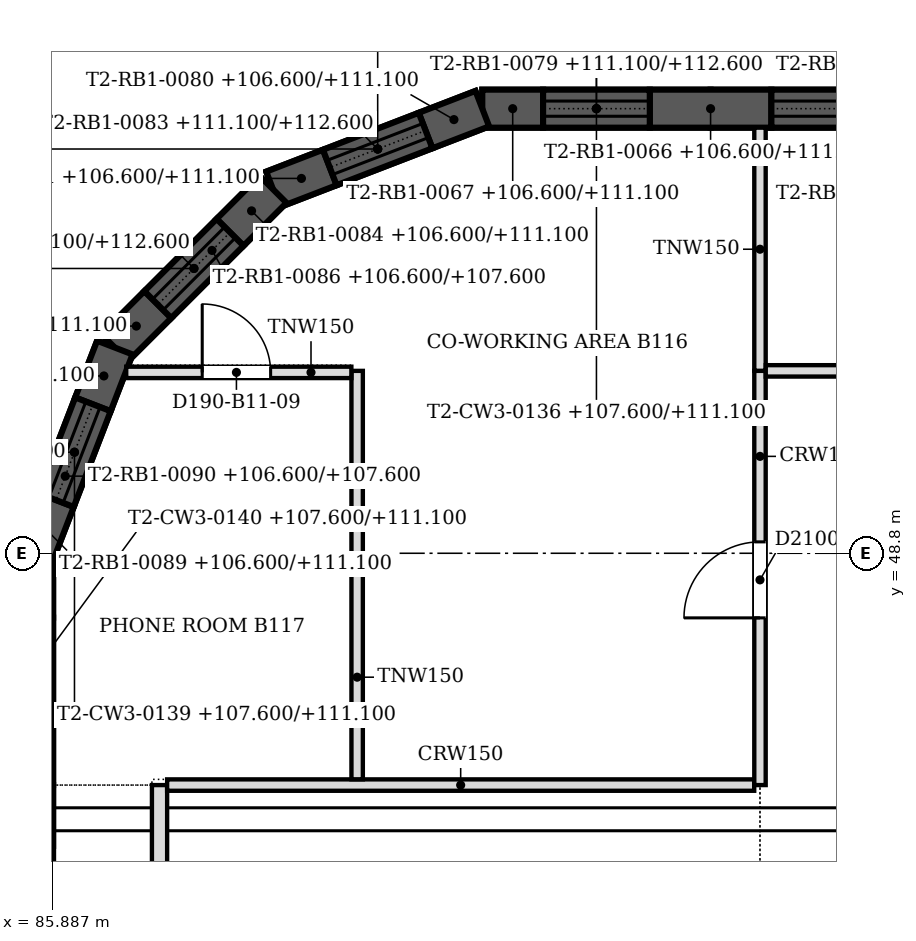
"""IFC4 building model, lengths in metres.
Left out: names, types, materials, properties, quantities, classifications, styles, units other than length and angle.
Written with IfcOpenShell. Run it as: python <this file> out.ifc"""

import sys

from ifc_helpers import new_model, si_unit, direction, frame, frame_2d, origin, place, context, subcontext, project, spatial, polyline, rectangle, outline, extrude, faceted_brep, source, transform, mapped, element, fill, save


model = new_model("IFC4")
c1 = context("Model", 3, precision=1e-05, world=origin(), true_north=direction((0.0, 1.0)))
c2 = subcontext(c1, "Body", "Model", "MODEL_VIEW")
j1 = project(units=[si_unit("LENGTHUNIT", "METRE"), si_unit("PLANEANGLEUNIT", "RADIAN")], contexts=[c1])
p1 = place(None, origin())
s1 = spatial("IfcSite", under=j1, at=p1, CompositionType="ELEMENT")
p2 = place(p1, origin())
s2 = spatial("IfcBuilding", under=s1, at=p2, CompositionType="ELEMENT")
p3 = place(p2, frame((0.0, 0.0, 106.6)))
s3 = spatial("IfcBuildingStorey", under=s2, at=p3, CompositionType="ELEMENT", Elevation=106.6)
m1 = source(origin(), c2, "Body", "SweptSolid", [
    extrude(outline(polyline([(0.0, 0.0), (1.6, 0.0), (1.6, 4.5), (0.0, 4.5), (0.0, 0.0)])), frame((0.0, 0.25, 0.0), z_axis=(0.0, -1.0, 0.0), x_axis=(1.0, 0.0, 0.0)), (0.0, 0.0, 1.0), 0.5),
])
p4 = place(p3, frame((95.35, 54.65, 0.0), z_axis=(0.0, 0.0, 1.0), x_axis=(-1.0, 0.0, 0.0)))
e1 = element("IfcWall", 1, at=p4, inside=s3, PredefinedType="SOLIDWALL", context=c2, shape_type="MappedRepresentation", body=[
    mapped(m1, transform((0.0, 0.0, 0.0), scale=1.0)),
])
m2 = source(origin(), c2, "Body", "Brep", [
    faceted_brep([(0.0, -0.25, 0.0), (0.8, -0.25, 0.0), (0.8, -0.25, 4.5), (0.0, -0.25, 4.5), (0.0, 0.25, 4.5), (0.753, 0.25, 4.5), (0.753, 0.25, 0.0), (0.0, 0.25, 0.0), (0.8, -0.0, 0.0), (0.8, -0.0, 4.5)], [[[0, 1, 2, 3]], [[4, 5, 6, 7]], [[7, 6, 8, 1, 0]], [[9, 2, 1, 8]], [[5, 4, 3, 2, 9]], [[4, 7, 0, 3]], [[8, 6, 5, 9]]]),
])
p5 = place(p3, frame((92.346, 54.65, 0.0), z_axis=(0.0, 0.0, 1.0), x_axis=(-1.0, 0.0, 0.0)))
e2 = element("IfcWall", 2, at=p5, inside=s3, PredefinedType="SOLIDWALL", context=c2, shape_type="MappedRepresentation", body=[
    mapped(m2, transform((0.0, 0.0, 0.0), scale=1.0)),
])
m3 = source(origin(), c2, "Body", "SweptSolid", [
    extrude(outline(polyline([(0.0, 0.0), (4.5, 0.0), (4.5, 1.0), (0.0, 1.0), (0.0, 0.0)])), frame((0.0, 0.25, 0.0), z_axis=(0.0, -1.0, 0.0), x_axis=(1.0, 0.0, 0.0)), (0.0, 0.0, 1.0), 0.5),
])
p6 = place(p3, frame((99.85, 54.65, 0.0), z_axis=(0.0, 0.0, 1.0), x_axis=(-1.0, 0.0, 0.0)))
e3 = element("IfcWall", 3, at=p6, inside=s3, PredefinedType="SOLIDWALL", context=c2, shape_type="MappedRepresentation", body=[
    mapped(m3, transform((0.0, 0.0, 0.0), scale=1.0)),
])
m4 = source(origin(), c2, "Body", "Brep", [
    faceted_brep([(0.0, -0.25, 0.0), (6.1, -0.25, 0.0), (6.1, -0.25, 1.5), (0.0, -0.25, 1.5), (0.0, 0.25, 1.5), (6.1, 0.25, 1.5), (6.1, 0.25, 0.0), (0.0, 0.25, 0.0)], [[[0, 1, 2, 3]], [[4, 5, 6, 7]], [[7, 6, 1, 0]], [[5, 4, 3, 2]], [[4, 7, 0, 3]], [[1, 6, 5, 2]]]),
])
p7 = place(p3, frame((100.65, 54.65, 4.5), z_axis=(0.0, 0.0, 1.0), x_axis=(-1.0, 0.0, 0.0)))
e4 = element("IfcWall", 4, at=p7, inside=s3, PredefinedType="SOLIDWALL", context=c2, shape_type="MappedRepresentation", body=[
    mapped(m4, transform((0.0, 0.0, 0.0), scale=1.0)),
])
m5 = source(origin(), c2, "Body", "SweptSolid", [
    extrude(outline(polyline([(0.0, 0.0), (1.404, 0.0), (1.404, 1.0), (0.0, 1.0), (0.0, 0.0)])), frame((0.0, 0.25, 0.0), z_axis=(0.0, -1.0, 0.0), x_axis=(1.0, 0.0, 0.0)), (0.0, 0.0, 1.0), 0.5),
])
p8 = place(p3, frame((93.75, 54.65, 0.0), z_axis=(0.0, 0.0, 1.0), x_axis=(-1.0, 0.0, 0.0)))
e5 = element("IfcWall", 5, at=p8, inside=s3, PredefinedType="SOLIDWALL", context=c2, shape_type="MappedRepresentation", body=[
    mapped(m5, transform((0.0, 0.0, 0.0), scale=1.0)),
])
m6 = source(origin(), c2, "Body", "Brep", [
    faceted_brep([(0.0, -0.25, 0.0), (3.003, -0.25, 0.0), (3.003, -0.25, 1.5), (0.0, -0.25, 1.5), (0.0, 0.25, 1.5), (2.957, 0.25, 1.5), (2.957, 0.25, 0.0), (0.0, 0.25, 0.0), (3.003, 0.0, 0.0), (3.003, 0.0, 1.5)], [[[0, 1, 2, 3]], [[4, 5, 6, 7]], [[7, 6, 8, 1, 0]], [[9, 2, 1, 8]], [[5, 4, 3, 2, 9]], [[4, 7, 0, 3]], [[8, 6, 5, 9]]]),
])
p9 = place(p3, frame((94.55, 54.65, 4.5), z_axis=(0.0, 0.0, 1.0), x_axis=(-1.0, 0.0, 0.0)))
e6 = element("IfcWall", 6, at=p9, inside=s3, PredefinedType="SOLIDWALL", context=c2, shape_type="MappedRepresentation", body=[
    mapped(m6, transform((0.0, 0.0, 0.0), scale=1.0)),
])
m7 = source(origin(), c2, "Body", "Brep", [
    faceted_brep([(0.0, -0.25, 0.0), (0.8, -0.25, 0.0), (0.8, -0.25, 4.5), (0.0, -0.25, 4.5), (0.047, 0.25, 4.5), (0.8, 0.25, 4.5), (0.8, 0.25, 0.0), (0.047, 0.25, 0.0), (0.0, 0.0, 0.0), (0.0, 0.0, 4.5)], [[[0, 1, 2, 3]], [[4, 5, 6, 7]], [[7, 6, 1, 0, 8]], [[5, 4, 9, 3, 2]], [[8, 0, 3, 9]], [[7, 8, 9, 4]], [[1, 6, 5, 2]]]),
])
p10 = place(p3, frame((91.547, 54.65, 0.0), z_axis=(0.0, 0.0, 1.0), x_axis=(-0.933054335486, -0.359735468129, 0.0)))
e7 = element("IfcWall", 7, at=p10, inside=s3, PredefinedType="SOLIDWALL", context=c2, shape_type="MappedRepresentation", body=[
    mapped(m7, transform((0.0, 0.0, 0.0), scale=1.0)),
])
m8 = source(origin(), c2, "Body", "Brep", [
    faceted_brep([(0.0, -0.25, 0.0), (0.8, -0.25, 0.0), (0.8, -0.25, 4.5), (0.0, -0.25, 4.5), (0.0, 0.25, 4.5), (0.747, 0.25, 4.5), (0.747, 0.25, 0.0), (0.0, 0.25, 0.0), (0.8, -0.0, 0.0), (0.8, -0.0, 4.5)], [[[0, 1, 2, 3]], [[4, 5, 6, 7]], [[7, 6, 8, 1, 0]], [[9, 2, 1, 8]], [[5, 4, 3, 2, 9]], [[4, 7, 0, 3]], [[8, 6, 5, 9]]]),
])
p11 = place(p3, frame((89.54, 53.876, 0.0), z_axis=(0.0, 0.0, 1.0), x_axis=(-0.93301483327, -0.3598379092, 0.0)))
e8 = element("IfcWall", 8, at=p11, inside=s3, PredefinedType="SOLIDWALL", context=c2, shape_type="MappedRepresentation", body=[
    mapped(m8, transform((0.0, 0.0, 0.0), scale=1.0)),
])
m9 = source(origin(), c2, "Body", "SweptSolid", [
    extrude(outline(polyline([(0.0, 0.0), (1.351, 0.0), (1.351, 1.0), (0.0, 1.0), (0.0, 0.0)])), frame((0.0, 0.25, 0.0), z_axis=(0.0, -1.0, 0.0), x_axis=(1.0, 0.0, 0.0)), (0.0, 0.0, 1.0), 0.5),
])
p12 = place(p3, frame((90.8, 54.362, 0.0), z_axis=(0.0, 0.0, 1.0), x_axis=(-0.932981713512, -0.359923772835, 0.0)))
e9 = element("IfcWall", 9, at=p12, inside=s3, PredefinedType="SOLIDWALL", context=c2, shape_type="MappedRepresentation", body=[
    mapped(m9, transform((0.0, 0.0, 0.0), scale=1.0)),
])
m10 = source(origin(), c2, "Body", "Brep", [
    faceted_brep([(0.0, -0.25, 0.0), (2.95, -0.25, 0.0), (2.95, -0.25, 1.5), (0.0, -0.25, 1.5), (0.047, 0.25, 1.5), (2.898, 0.25, 1.5), (2.898, 0.25, 0.0), (0.047, 0.25, 0.0), (2.95, 0.0, 0.0), (0.0, 0.0, 0.0), (2.95, 0.0, 1.5), (0.0, 0.0, 1.5)], [[[0, 1, 2, 3]], [[4, 5, 6, 7]], [[7, 6, 8, 1, 0, 9]], [[10, 2, 1, 8]], [[5, 4, 11, 3, 2, 10]], [[9, 0, 3, 11]], [[7, 9, 11, 4]], [[8, 6, 5, 10]]]),
])
p13 = place(p3, frame((91.547, 54.65, 4.5), z_axis=(0.0, 0.0, 1.0), x_axis=(-0.933010389544, -0.359849431015, 0.0)))
e10 = element("IfcWall", 10, at=p13, inside=s3, PredefinedType="SOLIDWALL", context=c2, shape_type="MappedRepresentation", body=[
    mapped(m10, transform((0.0, 0.0, 0.0), scale=1.0)),
])
m11 = source(origin(), c2, "Body", "Brep", [
    faceted_brep([(0.0, -0.25, 0.0), (0.8, -0.25, 0.0), (0.8, -0.25, 4.5), (0.0, -0.25, 4.5), (0.053, 0.25, 4.5), (0.8, 0.25, 4.5), (0.8, 0.25, 0.0), (0.053, 0.25, 0.0), (0.0, 0.0, 0.0), (0.0, 0.0, 4.5)], [[[0, 1, 2, 3]], [[4, 5, 6, 7]], [[7, 6, 1, 0, 8]], [[5, 4, 9, 3, 2]], [[8, 0, 3, 9]], [[7, 8, 9, 4]], [[1, 6, 5, 2]]]),
])
p14 = place(p3, frame((88.794, 53.588, 0.0), z_axis=(0.0, 0.0, 1.0), x_axis=(-0.707106781187, -0.707106781187, 0.0)))
e11 = element("IfcWall", 11, at=p14, inside=s3, PredefinedType="SOLIDWALL", context=c2, shape_type="MappedRepresentation", body=[
    mapped(m11, transform((0.0, 0.0, 0.0), scale=1.0)),
])
m12 = source(origin(), c2, "Body", "Brep", [
    faceted_brep([(0.0, -0.25, 0.0), (0.8, -0.25, 0.0), (0.8, -0.25, 4.5), (0.0, -0.25, 4.5), (0.0, 0.25, 4.5), (0.747, 0.25, 4.5), (0.747, 0.25, 0.0), (0.0, 0.25, 0.0), (0.8, -0.0, 0.0), (0.8, -0.0, 4.5)], [[[0, 1, 2, 3]], [[4, 5, 6, 7]], [[7, 6, 8, 1, 0]], [[9, 2, 1, 8]], [[5, 4, 3, 2, 9]], [[4, 7, 0, 3]], [[8, 6, 5, 9]]]),
])
p15 = place(p3, frame((87.278, 52.072, 0.0), z_axis=(0.0, 0.0, 1.0), x_axis=(-0.707106781187, -0.707106781187, 0.0)))
e12 = element("IfcWall", 12, at=p15, inside=s3, PredefinedType="SOLIDWALL", context=c2, shape_type="MappedRepresentation", body=[
    mapped(m12, transform((0.0, 0.0, 0.0), scale=1.0)),
])
m13 = source(origin(), c2, "Body", "SweptSolid", [
    extrude(outline(polyline([(0.0, 0.0), (1.344, 0.0), (1.344, 1.0), (0.0, 1.0), (0.0, 0.0)])), frame((0.0, 0.25, 0.0), z_axis=(0.0, -1.0, 0.0), x_axis=(1.0, 0.0, 0.0)), (0.0, 0.0, 1.0), 0.5),
])
p16 = place(p3, frame((88.228, 53.022, 0.0), z_axis=(0.0, 0.0, 1.0), x_axis=(-0.707106781187, -0.707106781187, 0.0)))
e13 = element("IfcWall", 13, at=p16, inside=s3, PredefinedType="SOLIDWALL", context=c2, shape_type="MappedRepresentation", body=[
    mapped(m13, transform((0.0, 0.0, 0.0), scale=1.0)),
])
m14 = source(origin(), c2, "Body", "Brep", [
    faceted_brep([(0.0, -0.25, 0.0), (2.944, -0.25, 0.0), (2.944, -0.25, 1.5), (0.0, -0.25, 1.5), (0.053, 0.25, 1.5), (2.891, 0.25, 1.5), (2.891, 0.25, 0.0), (0.053, 0.25, 0.0), (2.944, 0.0, 0.0), (0.0, 0.0, 0.0), (2.944, 0.0, 1.5), (0.0, 0.0, 1.5)], [[[0, 1, 2, 3]], [[4, 5, 6, 7]], [[7, 6, 8, 1, 0, 9]], [[10, 2, 1, 8]], [[5, 4, 11, 3, 2, 10]], [[9, 0, 3, 11]], [[7, 9, 11, 4]], [[8, 6, 5, 10]]]),
])
p17 = place(p3, frame((88.794, 53.588, 4.5), z_axis=(0.0, 0.0, 1.0), x_axis=(-0.707106781187, -0.707106781187, 0.0)))
e14 = element("IfcWall", 14, at=p17, inside=s3, PredefinedType="SOLIDWALL", context=c2, shape_type="MappedRepresentation", body=[
    mapped(m14, transform((0.0, 0.0, 0.0), scale=1.0)),
])
p18 = place(p3, frame((86.712, 51.506, 0.0), z_axis=(0.0, 0.0, 1.0), x_axis=(-0.359735468129, -0.933054335486, 0.0)))
e15 = element("IfcWall", 15, at=p18, inside=s3, PredefinedType="SOLIDWALL", context=c2, shape_type="MappedRepresentation", body=[
    mapped(m11, transform((0.0, 0.0, 0.0), scale=1.0)),
])
p19 = place(p3, frame((85.938, 49.5, 0.0), z_axis=(0.0, 0.0, 1.0), x_axis=(-0.360103552367, -0.932912338632, 0.0)))
e16 = element("IfcWall", 16, at=p19, inside=s3, PredefinedType="SOLIDWALL", context=c2, shape_type="MappedRepresentation", body=[
    mapped(m2, transform((0.0, 0.0, 0.0), scale=1.0)),
])
p20 = place(p3, frame((86.424, 50.76, 0.0), z_axis=(0.0, 0.0, 1.0), x_axis=(-0.359923772835, -0.932981713512, 0.0)))
e17 = element("IfcWall", 17, at=p20, inside=s3, PredefinedType="SOLIDWALL", context=c2, shape_type="MappedRepresentation", body=[
    mapped(m9, transform((0.0, 0.0, 0.0), scale=1.0)),
])
m15 = source(origin(), c2, "Body", "Brep", [
    faceted_brep([(0.0, -0.25, 0.0), (2.95, -0.25, 0.0), (2.95, -0.25, 1.5), (0.0, -0.25, 1.5), (0.053, 0.25, 1.5), (2.904, 0.25, 1.5), (2.904, 0.25, 0.0), (0.053, 0.25, 0.0), (2.95, 0.0, 0.0), (0.0, 0.0, 0.0), (2.95, 0.0, 1.5), (0.0, 0.0, 1.5)], [[[0, 1, 2, 3]], [[4, 5, 6, 7]], [[7, 6, 8, 1, 0, 9]], [[10, 2, 1, 8]], [[5, 4, 11, 3, 2, 10]], [[9, 0, 3, 11]], [[7, 9, 11, 4]], [[8, 6, 5, 10]]]),
])
p21 = place(p3, frame((86.712, 51.506, 4.5), z_axis=(0.0, 0.0, 1.0), x_axis=(-0.359849431015, -0.933010389544, 0.0)))
e18 = element("IfcWall", 18, at=p21, inside=s3, PredefinedType="SOLIDWALL", context=c2, shape_type="MappedRepresentation", body=[
    mapped(m15, transform((0.0, 0.0, 0.0), scale=1.0)),
])
p22 = place(p3, frame((85.65, 48.753, 0.0), z_axis=(0.0, 0.0, 1.0), x_axis=(0.0, -1.0, 0.0)))
e19 = element("IfcWall", 19, at=p22, inside=s3, PredefinedType="SOLIDWALL", context=c2, shape_type="MappedRepresentation", body=[
    mapped(m7, transform((0.0, 0.0, 0.0), scale=1.0)),
])
p23 = place(p3, frame((85.65, 46.55, 0.0), z_axis=(0.0, 0.0, 1.0), x_axis=(0.0, -1.0, 0.0)))
e20 = element("IfcWall", 20, at=p23, inside=s3, PredefinedType="SOLIDWALL", context=c2, shape_type="MappedRepresentation", body=[
    mapped(m1, transform((0.0, 0.0, 0.0), scale=1.0)),
])
m16 = source(origin(), c2, "Body", "Brep", [
    faceted_brep([(0.0, -0.25, 0.0), (1.403, -0.25, 0.0), (1.403, -0.25, 1.0), (0.0, -0.25, 1.0), (0.0, 0.25, 1.0), (1.403, 0.25, 1.0), (1.403, 0.25, 0.0), (0.0, 0.25, 0.0)], [[[0, 1, 2, 3]], [[4, 5, 6, 7]], [[7, 6, 1, 0]], [[5, 4, 3, 2]], [[4, 7, 0, 3]], [[1, 6, 5, 2]]]),
])
p24 = place(p3, frame((85.65, 47.953, 0.0), z_axis=(0.0, 0.0, 1.0), x_axis=(0.0, -1.0, 0.0)))
e21 = element("IfcWall", 21, at=p24, inside=s3, PredefinedType="SOLIDWALL", context=c2, shape_type="MappedRepresentation", body=[
    mapped(m16, transform((0.0, 0.0, 0.0), scale=1.0)),
])
m17 = source(origin(), c2, "Body", "Brep", [
    faceted_brep([(0.0, -0.25, 0.0), (3.003, -0.25, 0.0), (3.003, -0.25, 1.5), (0.0, -0.25, 1.5), (0.047, 0.25, 1.5), (3.003, 0.25, 1.5), (3.003, 0.25, 0.0), (0.047, 0.25, 0.0), (0.0, 0.0, 0.0), (0.0, 0.0, 1.5)], [[[0, 1, 2, 3]], [[4, 5, 6, 7]], [[7, 6, 1, 0, 8]], [[6, 5, 2, 1]], [[5, 4, 9, 3, 2]], [[8, 0, 3, 9]], [[7, 8, 9, 4]]]),
])
p25 = place(p3, frame((85.65, 48.753, 4.5), z_axis=(0.0, 0.0, 1.0), x_axis=(0.0, -1.0, 0.0)))
e22 = element("IfcWall", 22, at=p25, inside=s3, PredefinedType="SOLIDWALL", context=c2, shape_type="MappedRepresentation", body=[
    mapped(m17, transform((0.0, 0.0, 0.0), scale=1.0)),
])
m18 = source(origin(), c2, "Body", "SweptSolid", [
    extrude(outline(polyline([(0.0, 0.0), (6.1, 0.0), (6.1, 1.5), (0.0, 1.5), (0.0, 0.0)])), frame((0.0, 0.25, 0.0), z_axis=(0.0, -1.0, 0.0), x_axis=(1.0, 0.0, 0.0)), (0.0, 0.0, 1.0), 0.5),
])
p26 = place(p3, frame((85.65, 45.75, 4.5), z_axis=(0.0, 0.0, 1.0), x_axis=(0.0, -1.0, 0.0)))
e23 = element("IfcWall", 23, at=p26, inside=s3, PredefinedType="SOLIDWALL", context=c2, shape_type="MappedRepresentation", body=[
    mapped(m18, transform((0.0, 0.0, 0.0), scale=1.0)),
])
p27 = place(p3, frame((87.3, 45.75, 0.0), z_axis=(0.0, 0.0, 1.0), x_axis=(0.0, -1.0, 0.0)))
e24 = element("IfcWall", 24, at=p27, inside=s3, PredefinedType="PARTITIONING", context=c2, shape_type="SweptSolid", body=[
    extrude(rectangle(XDim=6.1, YDim=0.2, at=frame_2d((3.05, 0.0))), origin(), (0.0, 0.0, 1.0), 5.167),
])
m19 = source(origin(), c2, "Body", "SweptSolid", [
    extrude(rectangle(XDim=2.1, YDim=2.1, at=frame_2d((1.05, 1.05))), frame((0.0, 0.11, 0.0), z_axis=(0.0, -1.0, 0.0), x_axis=(1.0, 0.0, 0.0)), (0.0, 0.0, 1.0), 0.22),
])
p28 = place(p27, frame((2.0, 0.0, 0.0)))
e25 = element("IfcOpeningElement", 25, at=p28, cuts=e24, PredefinedType="OPENING", context=c2, shape_type="MappedRepresentation", body=[
    mapped(m19, transform((0.0, 0.0, 0.0), scale=1.0)),
])
p29 = place(p3, frame((87.4, 45.75, 0.0), z_axis=(0.0, 0.0, 1.0), x_axis=(1.0, 0.0, 0.0)))
e26 = element("IfcWall", 26, at=p29, inside=s3, PredefinedType="PARTITIONING", context=c2, shape_type="SweptSolid", body=[
    extrude(rectangle(XDim=7.724, YDim=0.15, at=frame_2d((3.862, 0.0))), origin(), (0.0, 0.0, 1.0), 5.167),
])
p30 = place(p3, frame((95.2, 45.75, 0.0), z_axis=(0.0, 0.0, 1.0), x_axis=(0.0, 1.0, 0.0)))
e27 = element("IfcWall", 27, at=p30, inside=s3, PredefinedType="PARTITIONING", context=c2, shape_type="SweptSolid", body=[
    extrude(rectangle(XDim=5.45, YDim=0.15, at=frame_2d((2.725, 0.0))), origin(), (0.0, 0.0, 1.0), 5.167),
])
m20 = source(origin(), c2, "Body", "SweptSolid", [
    extrude(rectangle(XDim=1.0, YDim=2.1, at=frame_2d((0.5, 1.05))), frame((0.0, 0.085, 0.0), z_axis=(0.0, -1.0, 0.0), x_axis=(1.0, 0.0, 0.0)), (0.0, 0.0, 1.0), 0.17),
])
p31 = place(p30, frame((2.2, 0.0, 0.0)))
e28 = element("IfcOpeningElement", 28, at=p31, cuts=e27, PredefinedType="OPENING", context=c2, shape_type="MappedRepresentation", body=[
    mapped(m20, transform((0.0, 0.0, 0.0), scale=1.0)),
])
p32 = place(p3, frame((89.9, 45.826, 0.0), z_axis=(0.0, 0.0, 1.0), x_axis=(0.0, 1.0, 0.0)))
e29 = element("IfcWall", 29, at=p32, inside=s3, PredefinedType="PARTITIONING", context=c2, shape_type="SweptSolid", body=[
    extrude(rectangle(XDim=5.374, YDim=0.15, at=frame_2d((2.687, 0.0))), origin(), (0.0, 0.0, 1.0), 5.167),
])
p33 = place(p3, frame((89.824, 51.18, 0.0), z_axis=(0.0, 0.0, 1.0), x_axis=(-1.0, 0.0, 0.0)))
e30 = element("IfcWall", 30, at=p33, inside=s3, PredefinedType="PARTITIONING", context=c2, shape_type="SweptSolid", body=[
    extrude(rectangle(XDim=2.962, YDim=0.15, at=frame_2d((1.481, 0.0))), origin(), (0.0, 0.0, 1.0), 5.167),
])
m21 = source(origin(), c2, "Body", "SweptSolid", [
    extrude(rectangle(XDim=0.9, YDim=2.1, at=frame_2d((0.45, 1.05))), frame((0.0, 0.085, 0.0), z_axis=(0.0, -1.0, 0.0), x_axis=(1.0, 0.0, 0.0)), (0.0, 0.0, 1.0), 0.17),
])
p34 = place(p33, frame((1.062, 0.0, 0.0)))
e31 = element("IfcOpeningElement", 31, at=p34, cuts=e30, PredefinedType="OPENING", context=c2, shape_type="MappedRepresentation", body=[
    mapped(m21, transform((0.0, 0.0, 0.0), scale=1.0)),
])
p35 = place(p3, frame((95.2, 51.201, 0.0), z_axis=(0.0, 0.0, 1.0), x_axis=(0.0, 1.0, 0.0)))
e32 = element("IfcWall", 32, at=p35, inside=s3, PredefinedType="PARTITIONING", context=c2, shape_type="SweptSolid", body=[
    extrude(rectangle(XDim=3.199, YDim=0.15, at=frame_2d((1.6, 0.0))), origin(), (0.0, 0.0, 1.0), 5.167),
])
p36 = place(p3, frame((95.276, 51.2, 0.0), z_axis=(0.0, 0.0, 1.0), x_axis=(1.0, 0.0, 0.0)))
e33 = element("IfcWall", 33, at=p36, inside=s3, PredefinedType="PARTITIONING", context=c2, shape_type="SweptSolid", body=[
    extrude(rectangle(XDim=4.724, YDim=0.15, at=frame_2d((2.362, 0.0))), origin(), (0.0, 0.0, 1.0), 5.167),
])
p37 = place(p36, frame((1.9, 0.0, 0.0)))
e34 = element("IfcOpeningElement", 34, at=p37, cuts=e33, PredefinedType="OPENING", context=c2, shape_type="MappedRepresentation", body=[
    mapped(m21, transform((0.0, 0.0, 0.0), scale=1.0)),
])
m22 = source(origin(), c2, "Body", "SweptSolid", [
    extrude(rectangle(XDim=1.0, YDim=2.1, at=frame_2d((0.5, 1.05))), frame((0.0, 0.025, 0.0), z_axis=(0.0, -1.0, 0.0), x_axis=(1.0, 0.0, 0.0)), (0.0, 0.0, 1.0), 0.05),
])
p38 = place(p31, origin())
e35 = element("IfcDoor", 35, at=p38, inside=s3, OperationType="SINGLE_SWING_LEFT", PredefinedType="DOOR", context=c2, shape_type="MappedRepresentation", body=[
    mapped(m22, transform((0.0, 0.0, 0.0), scale=1.0)),
])
fill(e28, e35)
m23 = source(origin(), c2, "Body", "SweptSolid", [
    extrude(rectangle(XDim=0.9, YDim=2.1, at=frame_2d((0.45, 1.05))), frame((0.0, 0.025, 0.0), z_axis=(0.0, -1.0, 0.0), x_axis=(1.0, 0.0, 0.0)), (0.0, 0.0, 1.0), 0.05),
])
p39 = place(p34, origin())
e36 = element("IfcDoor", 36, at=p39, inside=s3, OperationType="SINGLE_SWING_RIGHT", PredefinedType="DOOR", context=c2, shape_type="MappedRepresentation", body=[
    mapped(m23, transform((0.0, 0.0, 0.0), scale=1.0)),
])
fill(e31, e36)
save(model, sys.argv[1])
